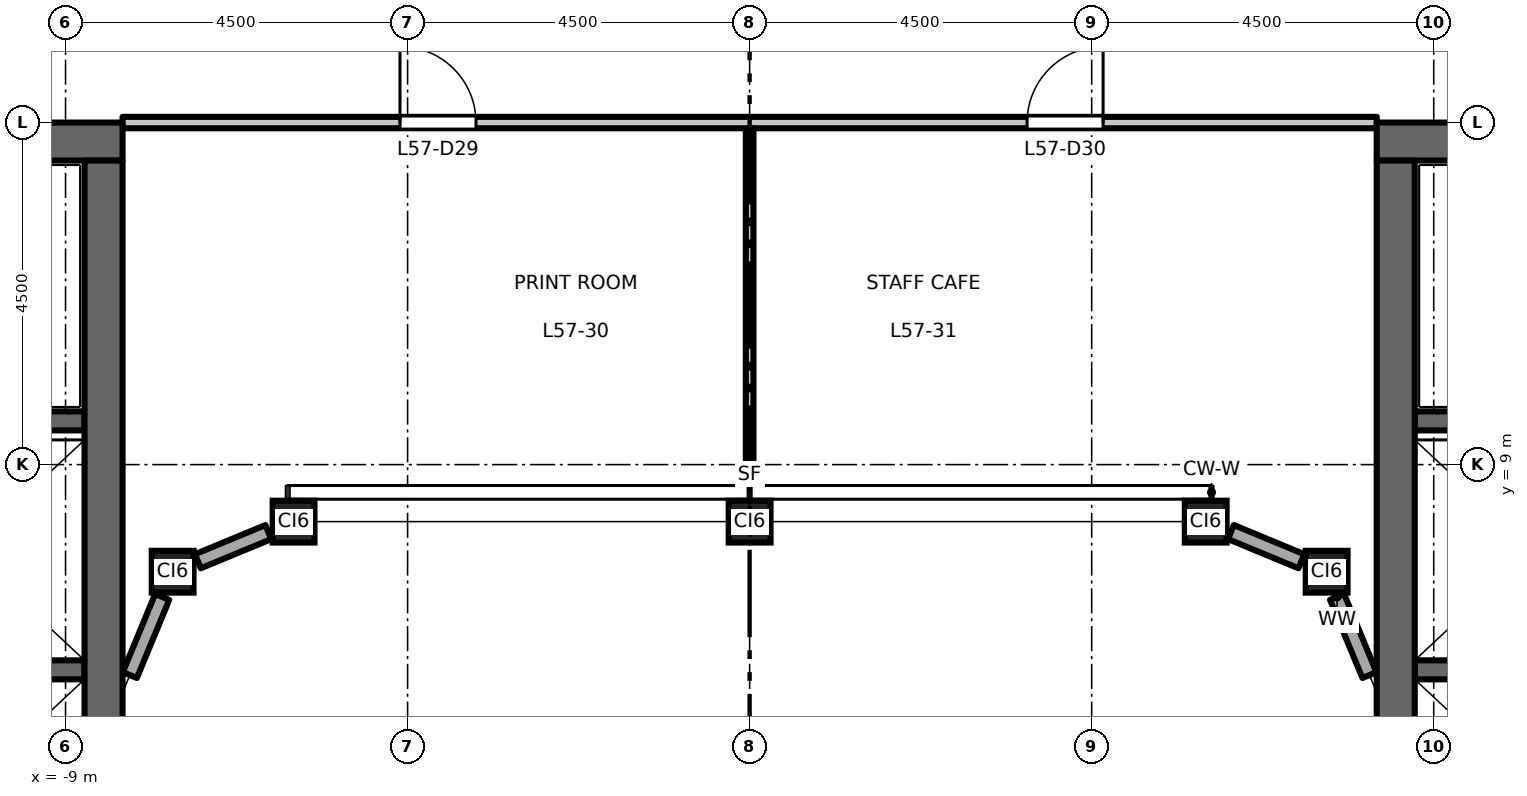
"""IFC4 building model, lengths in metres.
Left out: names, types, materials, properties, quantities, classifications, styles, units other than length and angle.
Written with IfcOpenShell. Run it as: python <this file> out.ifc"""

import sys

from ifc_helpers import new_model, si_unit, direction, frame, frame_2d, origin, origin_2d, place, context, subcontext, project, spatial, rectangle, hollow_rectangle, extrude, element, fill, save


model = new_model("IFC4")
c1 = context("Model", 3, precision=1e-05, world=origin(), true_north=direction((0.0, 1.0)))
c2 = subcontext(c1, "Body", "Model", "MODEL_VIEW")
j1 = project(units=[si_unit("LENGTHUNIT", "METRE"), si_unit("PLANEANGLEUNIT", "RADIAN")], contexts=[c1])
p1 = place(None, origin())
s1 = spatial("IfcSite", under=j1, at=p1, CompositionType="ELEMENT")
p2 = place(p1, origin())
s2 = spatial("IfcBuilding", under=s1, at=p2, CompositionType="ELEMENT")
p3 = place(p2, frame((0.0, 0.0, 264.7)))
s3 = spatial("IfcBuildingStorey", under=s2, at=p3, CompositionType="ELEMENT", Elevation=264.7)
for number, where, z_axis, x_axis in (
    (1, (-7.591, 7.591, 0.0), (0.0, 0.0, 1.0), (1.0, 0.0, 0.0)),
    (2, (-6.0, 8.25, 0.0), (0.0, 0.0, 1.0), (1.0, 0.0, 0.0)),
    (3, (0.0, 8.25, 0.0), (0.0, 0.0, 1.0), (1.0, 0.0, 0.0)),
    (4, (6.0, 8.25, 0.0), (0.0, 0.0, 1.0), (1.0, 0.0, 0.0)),
    (5, (7.591, 7.591, 0.0), (0.0, 0.0, 1.0), (1.0, 0.0, 0.0)),
):
    element("IfcColumn", number, at=place(p3, frame(where, z_axis=z_axis, x_axis=x_axis)), inside=s3, PredefinedType="COLUMN", context=c2, shape_type="SweptSolid", body=[
        extrude(hollow_rectangle(XDim=0.55, YDim=0.55, WallThickness=0.028, at=origin_2d()), origin(), (0.0, 0.0, 1.0), 4.5),
    ])
p4 = place(p3, frame((-8.75, 6.3, 0.0), z_axis=(0.0, 0.0, 1.0), x_axis=(-1.0, 0.0, 0.0)))
e6 = element("IfcWall", 6, at=p4, inside=s3, PredefinedType="SHEAR", context=c2, shape_type="SweptSolid", body=[
    extrude(rectangle(XDim=3.1, YDim=0.25, at=frame_2d((1.55, 0.0))), origin(), (0.0, 0.0, 1.0), 4.35),
])
p5 = place(p3, frame((-8.75, 9.575, 0.0), z_axis=(0.0, 0.0, 1.0), x_axis=(-1.0, 0.0, 0.0)))
e7 = element("IfcWall", 7, at=p5, inside=s3, PredefinedType="SHEAR", context=c2, shape_type="SweptSolid", body=[
    extrude(rectangle(XDim=8.0, YDim=0.25, at=frame_2d((4.0, 0.0))), origin(), (0.0, 0.0, 1.0), 4.35),
])
p6 = place(p5, frame((6.65, 0.0, 0.0)))
e8 = element("IfcOpeningElement", 8, at=p6, cuts=e7, PredefinedType="OPENING", context=c2, shape_type="SweptSolid", body=[
    extrude(rectangle(XDim=1.1, YDim=2.1, at=frame_2d((0.55, 1.05))), frame((0.0, 0.135, 0.0), z_axis=(0.0, -1.0, 0.0), x_axis=(1.0, 0.0, 0.0)), (0.0, 0.0, 1.0), 0.27),
])
p7 = place(p3, frame((-8.25, 13.25, 0.0), z_axis=(0.0, 0.0, 1.0), x_axis=(-1.0, 0.0, 0.0)))
e9 = element("IfcWall", 9, at=p7, inside=s3, PredefinedType="SHEAR", context=c2, shape_type="SweptSolid", body=[
    extrude(rectangle(XDim=13.5, YDim=0.5, at=frame_2d((6.75, 0.0))), origin(), (0.0, 0.0, 1.0), 4.35),
])
p8 = place(p3, frame((-8.5, -13.0, 0.0), z_axis=(0.0, 0.0, 1.0), x_axis=(0.0, 1.0, 0.0)))
e10 = element("IfcWall", 10, at=p8, inside=s3, PredefinedType="SHEAR", context=c2, shape_type="SweptSolid", body=[
    extrude(rectangle(XDim=26.0, YDim=0.5, at=frame_2d((13.0, 0.0))), origin(), (0.0, 0.0, 1.0), 4.35),
])
p9 = place(p3, frame((8.75, 6.3, 0.0), z_axis=(0.0, 0.0, 1.0), x_axis=(1.0, 0.0, 0.0)))
e11 = element("IfcWall", 11, at=p9, inside=s3, PredefinedType="SHEAR", context=c2, shape_type="SweptSolid", body=[
    extrude(rectangle(XDim=3.1, YDim=0.25, at=frame_2d((1.55, 0.0))), origin(), (0.0, 0.0, 1.0), 4.35),
])
p10 = place(p3, frame((8.75, 9.575, 0.0), z_axis=(0.0, 0.0, 1.0), x_axis=(1.0, 0.0, 0.0)))
e12 = element("IfcWall", 12, at=p10, inside=s3, PredefinedType="SHEAR", context=c2, shape_type="SweptSolid", body=[
    extrude(rectangle(XDim=8.0, YDim=0.25, at=frame_2d((4.0, 0.0))), origin(), (0.0, 0.0, 1.0), 4.35),
])
p11 = place(p10, frame((6.65, 0.0, 0.0)))
e13 = element("IfcOpeningElement", 13, at=p11, cuts=e12, PredefinedType="OPENING", context=c2, shape_type="SweptSolid", body=[
    extrude(rectangle(XDim=1.1, YDim=2.1, at=frame_2d((0.55, 1.05))), frame((0.0, 0.135, 0.0), z_axis=(0.0, -1.0, 0.0), x_axis=(1.0, 0.0, 0.0)), (0.0, 0.0, 1.0), 0.27),
])
p12 = place(p3, frame((8.25, 13.25, 0.0), z_axis=(0.0, 0.0, 1.0), x_axis=(1.0, 0.0, 0.0)))
e14 = element("IfcWall", 14, at=p12, inside=s3, PredefinedType="SHEAR", context=c2, shape_type="SweptSolid", body=[
    extrude(rectangle(XDim=13.5, YDim=0.5, at=frame_2d((6.75, 0.0))), origin(), (0.0, 0.0, 1.0), 4.35),
])
p13 = place(p3, frame((8.5, -13.0, 0.0), z_axis=(0.0, 0.0, 1.0), x_axis=(0.0, 1.0, 0.0)))
e15 = element("IfcWall", 15, at=p13, inside=s3, PredefinedType="SHEAR", context=c2, shape_type="SweptSolid", body=[
    extrude(rectangle(XDim=26.0, YDim=0.5, at=frame_2d((13.0, 0.0))), origin(), (0.0, 0.0, 1.0), 4.35),
])
p14 = place(p3, frame((8.154, 6.231, 0.0), z_axis=(0.0, 0.0, 1.0), x_axis=(-0.382635994082, 0.923899180665, 0.0)))
e16 = element("IfcWall", 16, at=p14, inside=s3, PredefinedType="STANDARD", context=c2, shape_type="SweptSolid", body=[
    extrude(rectangle(XDim=1.113, YDim=0.2, at=frame_2d((0.556, 0.0))), origin(), (0.0, 0.0, 1.0), 3.918),
])
for number, where, z_axis, x_axis in (
    (17, (7.259, 7.729, 0.0), (0.0, 0.0, 1.0), (-0.924, 0.383, 0.0)),
    (18, (-6.332, 8.113, 0.0), (0.0, 0.0, 1.0), (-0.924, -0.383, 0.0)),
):
    element("IfcWall", number, at=place(p3, frame(where, z_axis=z_axis, x_axis=x_axis)), inside=s3, PredefinedType="STANDARD", context=c2, shape_type="SweptSolid", body=[
        extrude(rectangle(XDim=1.003, YDim=0.2, at=frame_2d((0.502, 0.0))), origin(), (0.0, 0.0, 1.0), 3.918),
    ])
p15 = place(p3, frame((-7.729, 7.259, 0.0), z_axis=(0.0, 0.0, 1.0), x_axis=(-0.382635994082, -0.923899180665, 0.0)))
e19 = element("IfcWall", 19, at=p15, inside=s3, PredefinedType="STANDARD", context=c2, shape_type="SweptSolid", body=[
    extrude(rectangle(XDim=1.113, YDim=0.2, at=frame_2d((0.556, 0.0))), origin(), (0.0, 0.0, 1.0), 3.918),
])
p16 = place(p3, frame((-8.25, 13.5, 0.0), z_axis=(0.0, 0.0, 1.0), x_axis=(1.0, 0.0, 0.0)))
e20 = element("IfcWall", 20, at=p16, inside=s3, PredefinedType="PARTITIONING", context=c2, shape_type="SweptSolid", body=[
    extrude(rectangle(XDim=16.5, YDim=0.15, at=frame_2d((8.25, 0.0))), origin(), (0.0, 0.0, 1.0), 4.35),
])
p17 = place(p16, frame((3.65, 0.0, 0.0)))
e21 = element("IfcOpeningElement", 21, at=p17, cuts=e20, PredefinedType="OPENING", context=c2, shape_type="SweptSolid", body=[
    extrude(rectangle(XDim=1.0, YDim=2.1, at=frame_2d((0.5, 1.05))), frame((0.0, 0.085, 0.0), z_axis=(0.0, -1.0, 0.0), x_axis=(1.0, 0.0, 0.0)), (0.0, 0.0, 1.0), 0.17),
])
p18 = place(p16, frame((11.9, 0.0, 0.0)))
e22 = element("IfcOpeningElement", 22, at=p18, cuts=e20, PredefinedType="OPENING", context=c2, shape_type="SweptSolid", body=[
    extrude(rectangle(XDim=1.0, YDim=2.1, at=frame_2d((0.5, 1.05))), frame((0.0, 0.085, 0.0), z_axis=(0.0, -1.0, 0.0), x_axis=(1.0, 0.0, 0.0)), (0.0, 0.0, 1.0), 0.17),
])
p19 = place(p3, frame((0.0, 8.6, 0.0), z_axis=(0.0, 0.0, 1.0), x_axis=(0.0, 1.0, 0.0)))
e23 = element("IfcWall", 23, at=p19, inside=s3, PredefinedType="PARTITIONING", context=c2, shape_type="SweptSolid", body=[
    extrude(rectangle(XDim=4.825, YDim=0.1, at=frame_2d((2.413, 0.0))), origin(), (0.0, 0.0, 1.0), 3.55),
])
p20 = place(p17, origin())
e24 = element("IfcDoor", 24, at=p20, inside=s3, OperationType="SINGLE_SWING_LEFT", PredefinedType="DOOR", context=c2, shape_type="SweptSolid", body=[
    extrude(rectangle(XDim=1.0, YDim=2.1, at=frame_2d((0.5, 1.05))), frame((0.0, 0.025, 0.0), z_axis=(0.0, -1.0, 0.0), x_axis=(1.0, 0.0, 0.0)), (0.0, 0.0, 1.0), 0.05),
])
fill(e21, e24)
p21 = place(p18, origin())
e25 = element("IfcDoor", 25, at=p21, inside=s3, OperationType="SINGLE_SWING_RIGHT", PredefinedType="DOOR", context=c2, shape_type="SweptSolid", body=[
    extrude(rectangle(XDim=1.0, YDim=2.1, at=frame_2d((0.5, 1.05))), frame((0.0, 0.025, 0.0), z_axis=(0.0, -1.0, 0.0), x_axis=(1.0, 0.0, 0.0)), (0.0, 0.0, 1.0), 0.05),
])
fill(e22, e25)
save(model, sys.argv[1])
